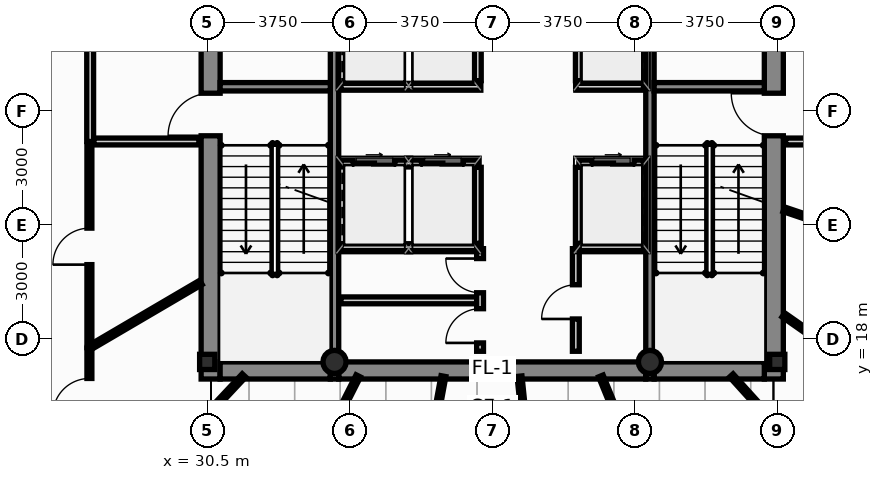
"""IFC4 building model, lengths in metres.
Left out: names, types, materials, properties, quantities, classifications, styles, units other than length and angle.
Written with IfcOpenShell. Run it as: python <this file> out.ifc"""

import sys

from ifc_helpers import new_model, si_unit, direction, frame, frame_2d, origin, origin_2d, place, context, subcontext, project, spatial, rectangle, hollow_circle, i_section, extrude, source, transform, mapped, element, fill, save


model = new_model("IFC4")
c1 = context("Model", 3, precision=1e-05, world=origin(), true_north=direction((0.0, 1.0)))
c2 = subcontext(c1, "Body", "Model", "MODEL_VIEW")
j1 = project(units=[si_unit("LENGTHUNIT", "METRE"), si_unit("PLANEANGLEUNIT", "RADIAN")], contexts=[c1])
p1 = place(None, origin())
s1 = spatial("IfcSite", under=j1, at=p1, CompositionType="ELEMENT")
p2 = place(p1, origin())
s2 = spatial("IfcBuilding", under=s1, at=p2, CompositionType="ELEMENT")
p3 = place(p2, frame((0.0, 0.0, 127.3)))
s3 = spatial("IfcBuildingStorey", under=s2, at=p3, CompositionType="ELEMENT", Elevation=127.3)
m1 = source(origin(), c2, "Body", "SweptSolid", [
    extrude(i_section(OverallWidth=0.4, OverallDepth=0.4, WebThickness=0.02, FlangeThickness=0.032, at=origin_2d()), origin(), (0.0, 0.0, 1.0), 4.5),
])
for number, where, z_axis, x_axis in (
    (1, (30.5, 17.4, 0.0), (0.0, 0.0, 1.0), (1.0, 0.0, 0.0)),
    (2, (45.5, 17.4, 0.0), (0.0, 0.0, 1.0), (1.0, 0.0, 0.0)),
):
    element("IfcColumn", number, at=place(p3, frame(where, z_axis=z_axis, x_axis=x_axis)), inside=s3, PredefinedType="COLUMN", context=c2, shape_type="MappedRepresentation", body=[
        mapped(m1, transform((0.0, 0.0, 0.0), scale=1.0)),
    ])
m2 = source(origin(), c2, "Body", "SweptSolid", [
    extrude(hollow_circle(Radius=0.305, WallThickness=0.025, at=origin_2d()), origin(), (0.0, 0.0, 1.0), 4.5),
])
for number, where, z_axis, x_axis in (
    (3, (33.85, 17.4, 0.0), (0.0, 0.0, 1.0), (1.0, 0.0, 0.0)),
    (4, (42.15, 17.4, 0.0), (0.0, 0.0, 1.0), (1.0, 0.0, 0.0)),
):
    element("IfcColumn", number, at=place(p3, frame(where, z_axis=z_axis, x_axis=x_axis)), inside=s3, PredefinedType="COLUMN", context=c2, shape_type="MappedRepresentation", body=[
        mapped(m2, transform((0.0, 0.0, 0.0), scale=1.0)),
    ])
p4 = place(p3, frame((30.59, 16.95, 0.0), z_axis=(0.0, 0.0, 1.0), x_axis=(0.0, 1.0, 0.0)))
e5 = element("IfcWall", 5, at=p4, inside=s3, PredefinedType="SHEAR", context=c2, shape_type="SweptSolid", body=[
    extrude(rectangle(XDim=13.275, YDim=0.5, at=frame_2d((6.638, 0.0))), origin(), (0.0, 0.0, 1.0), 4.5),
])
p5 = place(p4, frame((6.4, 0.0, 0.0)))
e6 = element("IfcOpeningElement", 6, at=p5, cuts=e5, PredefinedType="OPENING", context=c2, shape_type="SweptSolid", body=[
    extrude(rectangle(XDim=1.12, YDim=2.15, at=frame_2d((0.56, 1.075))), frame((0.0, 0.262, 0.0), z_axis=(0.0, -1.0, 0.0), x_axis=(1.0, 0.0, 0.0)), (0.0, 0.0, 1.0), 0.524),
])
p6 = place(p4, frame((10.85, 0.0, 0.0)))
e7 = element("IfcOpeningElement", 7, at=p6, cuts=e5, PredefinedType="OPENING", context=c2, shape_type="SweptSolid", body=[
    extrude(rectangle(XDim=1.2, YDim=2.2, at=frame_2d((0.6, 1.1))), frame((0.0, 0.262, 0.0), z_axis=(0.0, -1.0, 0.0), x_axis=(1.0, 0.0, 0.0)), (0.0, 0.0, 1.0), 0.524),
])
p7 = place(p3, frame((45.41, 16.95, 0.0), z_axis=(0.0, 0.0, 1.0), x_axis=(0.0, 1.0, 0.0)))
e8 = element("IfcWall", 8, at=p7, inside=s3, PredefinedType="SHEAR", context=c2, shape_type="SweptSolid", body=[
    extrude(rectangle(XDim=13.275, YDim=0.5, at=frame_2d((6.638, 0.0))), origin(), (0.0, 0.0, 1.0), 4.5),
])
p8 = place(p7, frame((6.4, 0.0, 0.0)))
e9 = element("IfcOpeningElement", 9, at=p8, cuts=e8, PredefinedType="OPENING", context=c2, shape_type="SweptSolid", body=[
    extrude(rectangle(XDim=1.12, YDim=2.15, at=frame_2d((0.56, 1.075))), frame((0.0, 0.262, 0.0), z_axis=(0.0, -1.0, 0.0), x_axis=(1.0, 0.0, 0.0)), (0.0, 0.0, 1.0), 0.524),
])
p9 = place(p7, frame((10.85, 0.0, 0.0)))
e10 = element("IfcOpeningElement", 10, at=p9, cuts=e8, PredefinedType="OPENING", context=c2, shape_type="SweptSolid", body=[
    extrude(rectangle(XDim=1.2, YDim=2.2, at=frame_2d((0.6, 1.1))), frame((0.0, 0.262, 0.0), z_axis=(0.0, -1.0, 0.0), x_axis=(1.0, 0.0, 0.0)), (0.0, 0.0, 1.0), 0.524),
])
p10 = place(p3, frame((30.84, 17.175, 0.0), z_axis=(0.0, 0.0, 1.0), x_axis=(1.0, 0.0, 0.0)))
e11 = element("IfcWall", 11, at=p10, inside=s3, PredefinedType="SHEAR", context=c2, shape_type="SweptSolid", body=[
    extrude(rectangle(XDim=2.9, YDim=0.45, at=frame_2d((1.45, 0.0))), origin(), (0.0, 0.0, 1.0), 4.5),
])
p11 = place(p3, frame((33.96, 17.175, 0.0), z_axis=(0.0, 0.0, 1.0), x_axis=(1.0, 0.0, 0.0)))
e12 = element("IfcWall", 12, at=p11, inside=s3, PredefinedType="SHEAR", context=c2, shape_type="SweptSolid", body=[
    extrude(rectangle(XDim=8.08, YDim=0.45, at=frame_2d((4.04, 0.0))), origin(), (0.0, 0.0, 1.0), 4.5),
])
p12 = place(p3, frame((42.26, 17.175, 0.0), z_axis=(0.0, 0.0, 1.0), x_axis=(1.0, 0.0, 0.0)))
e13 = element("IfcWall", 13, at=p12, inside=s3, PredefinedType="SHEAR", context=c2, shape_type="SweptSolid", body=[
    extrude(rectangle(XDim=2.9, YDim=0.45, at=frame_2d((1.45, 0.0))), origin(), (0.0, 0.0, 1.0), 4.5),
])
for number, where, z_axis, x_axis in (
    (14, (33.85, 16.95, 0.0), (0.0, 0.0, 1.0), (0.0, 1.0, 0.0)),
    (15, (42.15, 16.95, 0.0), (0.0, 0.0, 1.0), (0.0, 1.0, 0.0)),
):
    element("IfcWall", number, at=place(p3, frame(where, z_axis=z_axis, x_axis=x_axis)), inside=s3, PredefinedType="SHEAR", context=c2, shape_type="SweptSolid", body=[
        extrude(rectangle(XDim=13.275, YDim=0.22, at=frame_2d((6.638, 0.0))), origin(), (0.0, 0.0, 1.0), 4.5),
    ])
for number, where, z_axis, x_axis in (
    (16, (30.84, 24.64, 0.0), (0.0, 0.0, 1.0), (1.0, 0.0, 0.0)),
    (17, (42.26, 24.64, 0.0), (0.0, 0.0, 1.0), (1.0, 0.0, 0.0)),
):
    element("IfcWall", number, at=place(p3, frame(where, z_axis=z_axis, x_axis=x_axis)), inside=s3, PredefinedType="SHEAR", context=c2, shape_type="SweptSolid", body=[
        extrude(rectangle(XDim=2.9, YDim=0.22, at=frame_2d((1.45, 0.0))), origin(), (0.0, 0.0, 1.0), 4.5),
    ])
p13 = place(p3, frame((34.02, 22.62, 0.0), z_axis=(0.0, 0.0, 1.0), x_axis=(1.0, 0.0, 0.0)))
e18 = element("IfcWall", 18, at=p13, inside=s3, PredefinedType="PARTITIONING", context=c2, shape_type="SweptSolid", body=[
    extrude(rectangle(XDim=3.6, YDim=0.18, at=frame_2d((1.8, 0.0))), origin(), (0.0, 0.0, 1.0), 4.25),
])
p14 = place(p13, frame((0.32, 0.0, 0.0)))
e19 = element("IfcOpeningElement", 19, at=p14, cuts=e18, PredefinedType="OPENING", context=c2, shape_type="SweptSolid", body=[
    extrude(rectangle(XDim=1.1, YDim=2.2, at=frame_2d((0.55, 1.1))), frame((0.0, 0.102, 0.0), z_axis=(0.0, -1.0, 0.0), x_axis=(1.0, 0.0, 0.0)), (0.0, 0.0, 1.0), 0.204),
])
p15 = place(p13, frame((2.12, 0.0, 0.0)))
e20 = element("IfcOpeningElement", 20, at=p15, cuts=e18, PredefinedType="OPENING", context=c2, shape_type="SweptSolid", body=[
    extrude(rectangle(XDim=1.1, YDim=2.2, at=frame_2d((0.55, 1.1))), frame((0.0, 0.102, 0.0), z_axis=(0.0, -1.0, 0.0), x_axis=(1.0, 0.0, 0.0)), (0.0, 0.0, 1.0), 0.204),
])
p16 = place(p3, frame((40.28, 22.62, 0.0), z_axis=(0.0, 0.0, 1.0), x_axis=(1.0, 0.0, 0.0)))
e21 = element("IfcWall", 21, at=p16, inside=s3, PredefinedType="PARTITIONING", context=c2, shape_type="SweptSolid", body=[
    extrude(rectangle(XDim=1.7, YDim=0.18, at=frame_2d((0.85, 0.0))), origin(), (0.0, 0.0, 1.0), 4.25),
])
p17 = place(p16, frame((0.35, 0.0, 0.0)))
e22 = element("IfcOpeningElement", 22, at=p17, cuts=e21, PredefinedType="OPENING", context=c2, shape_type="SweptSolid", body=[
    extrude(rectangle(XDim=1.1, YDim=2.2, at=frame_2d((0.55, 1.1))), frame((0.0, 0.102, 0.0), z_axis=(0.0, -1.0, 0.0), x_axis=(1.0, 0.0, 0.0)), (0.0, 0.0, 1.0), 0.204),
])
for number, where, z_axis, x_axis in (
    (23, (37.62, 20.52, 0.0), (0.0, 0.0, 1.0), (0.0, 1.0, 0.0)),
    (24, (40.28, 20.52, 0.0), (0.0, 0.0, 1.0), (0.0, 1.0, 0.0)),
    (25, (37.62, 24.8, 0.0), (0.0, 0.0, 1.0), (0.0, 1.0, 0.0)),
    (26, (40.28, 24.8, 0.0), (0.0, 0.0, 1.0), (0.0, 1.0, 0.0)),
):
    element("IfcWall", number, at=place(p3, frame(where, z_axis=z_axis, x_axis=x_axis)), inside=s3, PredefinedType="PARTITIONING", context=c2, shape_type="SweptSolid", body=[
        extrude(rectangle(XDim=2.0, YDim=0.18, at=frame_2d((1.0, 0.0))), origin(), (0.0, 0.0, 1.0), 4.25),
    ])
p18 = place(p3, frame((34.02, 24.64, 0.0), z_axis=(0.0, 0.0, 1.0), x_axis=(1.0, 0.0, 0.0)))
e27 = element("IfcWall", 27, at=p18, inside=s3, PredefinedType="PARTITIONING", context=c2, shape_type="SweptSolid", body=[
    extrude(rectangle(XDim=3.68, YDim=0.18, at=frame_2d((1.84, 0.0))), origin(), (0.0, 0.0, 1.0), 4.25),
])
p19 = place(p3, frame((40.2, 24.64, 0.0), z_axis=(0.0, 0.0, 1.0), x_axis=(1.0, 0.0, 0.0)))
e28 = element("IfcWall", 28, at=p19, inside=s3, PredefinedType="PARTITIONING", context=c2, shape_type="SweptSolid", body=[
    extrude(rectangle(XDim=1.78, YDim=0.18, at=frame_2d((0.89, 0.0))), origin(), (0.0, 0.0, 1.0), 4.25),
])
p20 = place(p3, frame((27.42, 23.2, 0.0), z_axis=(0.0, 0.0, 1.0), x_axis=(0.0, 1.0, 0.0)))
e29 = element("IfcWall", 29, at=p20, inside=s3, PredefinedType="PARTITIONING", context=c2, shape_type="SweptSolid", body=[
    extrude(rectangle(XDim=6.4, YDim=0.18, at=frame_2d((3.2, 0.0))), origin(), (0.0, 0.0, 1.0), 3.928),
])
p21 = place(p20, frame((2.65, 0.0, 0.0)))
e30 = element("IfcOpeningElement", 30, at=p21, cuts=e29, PredefinedType="OPENING", context=c2, shape_type="SweptSolid", body=[
    extrude(rectangle(XDim=1.05, YDim=2.15, at=frame_2d((0.525, 1.075))), frame((0.0, 0.102, 0.0), z_axis=(0.0, -1.0, 0.0), x_axis=(1.0, 0.0, 0.0)), (0.0, 0.0, 1.0), 0.204),
])
for number, where, z_axis, x_axis in (
    (31, (27.52, 23.2, 0.0), (0.0, 0.0, 1.0), (1.0, 0.0, 0.0)),
    (32, (45.72, 23.2, 0.0), (0.0, 0.0, 1.0), (1.0, 0.0, 0.0)),
):
    element("IfcWall", number, at=place(p3, frame(where, z_axis=z_axis, x_axis=x_axis)), inside=s3, PredefinedType="PARTITIONING", context=c2, shape_type="SweptSolid", body=[
        extrude(rectangle(XDim=2.76, YDim=0.18, at=frame_2d((1.38, 0.0))), origin(), (0.0, 0.0, 1.0), 4.25),
    ])
p22 = place(p3, frame((34.02, 20.42, 0.0), z_axis=(0.0, 0.0, 1.0), x_axis=(1.0, 0.0, 0.0)))
e33 = element("IfcWall", 33, at=p22, inside=s3, PredefinedType="PARTITIONING", context=c2, shape_type="SweptSolid", body=[
    extrude(rectangle(XDim=3.64, YDim=0.18, at=frame_2d((1.82, 0.0))), origin(), (0.0, 0.0, 1.0), 4.25),
])
p23 = place(p3, frame((40.22, 20.42, 0.0), z_axis=(0.0, 0.0, 1.0), x_axis=(1.0, 0.0, 0.0)))
e34 = element("IfcWall", 34, at=p23, inside=s3, PredefinedType="PARTITIONING", context=c2, shape_type="SweptSolid", body=[
    extrude(rectangle(XDim=1.76, YDim=0.18, at=frame_2d((0.88, 0.0))), origin(), (0.0, 0.0, 1.0), 4.25),
])
p24 = place(p3, frame((34.02, 19.02, 0.0), z_axis=(0.0, 0.0, 1.0), x_axis=(1.0, 0.0, 0.0)))
e35 = element("IfcWall", 35, at=p24, inside=s3, PredefinedType="PARTITIONING", context=c2, shape_type="SweptSolid", body=[
    extrude(rectangle(XDim=3.58, YDim=0.18, at=frame_2d((1.79, 0.0))), origin(), (0.0, 0.0, 1.0), 4.25),
])
p25 = place(p3, frame((37.68, 17.68, 0.0), z_axis=(0.0, 0.0, 1.0), x_axis=(0.0, 1.0, 0.0)))
e36 = element("IfcWall", 36, at=p25, inside=s3, PredefinedType="PARTITIONING", context=c2, shape_type="SweptSolid", body=[
    extrude(rectangle(XDim=2.7, YDim=0.18, at=frame_2d((1.35, 0.0))), origin(), (0.0, 0.0, 1.0), 4.25),
])
p26 = place(p25, frame((0.22, 0.0, 0.0)))
e37 = element("IfcOpeningElement", 37, at=p26, cuts=e36, PredefinedType="OPENING", context=c2, shape_type="SweptSolid", body=[
    extrude(rectangle(XDim=0.9, YDim=2.1, at=frame_2d((0.45, 1.05))), frame((0.0, 0.102, 0.0), z_axis=(0.0, -1.0, 0.0), x_axis=(1.0, 0.0, 0.0)), (0.0, 0.0, 1.0), 0.204),
])
p27 = place(p25, frame((1.54, 0.0, 0.0)))
e38 = element("IfcOpeningElement", 38, at=p27, cuts=e36, PredefinedType="OPENING", context=c2, shape_type="SweptSolid", body=[
    extrude(rectangle(XDim=0.9, YDim=2.1, at=frame_2d((0.45, 1.05))), frame((0.0, 0.102, 0.0), z_axis=(0.0, -1.0, 0.0), x_axis=(1.0, 0.0, 0.0)), (0.0, 0.0, 1.0), 0.204),
])
p28 = place(p3, frame((40.2, 17.68, 0.0), z_axis=(0.0, 0.0, 1.0), x_axis=(0.0, 1.0, 0.0)))
e39 = element("IfcWall", 39, at=p28, inside=s3, PredefinedType="PARTITIONING", context=c2, shape_type="SweptSolid", body=[
    extrude(rectangle(XDim=2.7, YDim=0.18, at=frame_2d((1.35, 0.0))), origin(), (0.0, 0.0, 1.0), 4.25),
])
p29 = place(p28, frame((0.85, 0.0, 0.0)))
e40 = element("IfcOpeningElement", 40, at=p29, cuts=e39, PredefinedType="OPENING", context=c2, shape_type="SweptSolid", body=[
    extrude(rectangle(XDim=0.9, YDim=2.1, at=frame_2d((0.45, 1.05))), frame((0.0, 0.102, 0.0), z_axis=(0.0, -1.0, 0.0), x_axis=(1.0, 0.0, 0.0)), (0.0, 0.0, 1.0), 0.204),
])
p30 = place(p3, frame((45.671, 21.416, 0.0), z_axis=(0.0, 0.0, 1.0), x_axis=(0.947472988425, -0.319835795691, 0.0)))
e41 = element("IfcWall", 41, at=p30, inside=s3, PredefinedType="PARTITIONING", context=c2, shape_type="SweptSolid", body=[
    extrude(rectangle(XDim=18.887, YDim=0.13, at=frame_2d((9.444, 0.0))), origin(), (0.0, 0.0, 1.0), 4.25),
])
p31 = place(p30, frame((9.034, 0.0, 0.0)))
e42 = element("IfcOpeningElement", 42, at=p31, cuts=e41, PredefinedType="OPENING", context=c2, shape_type="SweptSolid", body=[
    extrude(rectangle(XDim=0.96, YDim=2.15, at=frame_2d((0.48, 1.075))), frame((0.0, 0.077, 0.0), z_axis=(0.0, -1.0, 0.0), x_axis=(1.0, 0.0, 0.0)), (0.0, 0.0, 1.0), 0.154),
])
p32 = place(p3, frame((45.661, 18.637, 0.0), z_axis=(0.0, 0.0, 1.0), x_axis=(0.819078192958, -0.573681892533, 0.0)))
e43 = element("IfcWall", 43, at=p32, inside=s3, PredefinedType="PARTITIONING", context=c2, shape_type="SweptSolid", body=[
    extrude(rectangle(XDim=17.313, YDim=0.13, at=frame_2d((8.656, 0.0))), origin(), (0.0, 0.0, 1.0), 4.25),
])
p33 = place(p3, frame((20.781, 5.646, 0.0), z_axis=(0.0, 0.0, 1.0), x_axis=(0.684024279875, 0.729459241179, 0.0)))
e44 = element("IfcWall", 44, at=p33, inside=s3, PredefinedType="PARTITIONING", context=c2, shape_type="SweptSolid", body=[
    extrude(rectangle(XDim=15.626, YDim=0.13, at=frame_2d((7.813, 0.0))), origin(), (0.0, 0.0, 1.0), 3.775),
])
p34 = place(p33, frame((7.399, 0.0, 0.0)))
e45 = element("IfcOpeningElement", 45, at=p34, cuts=e44, PredefinedType="OPENING", context=c2, shape_type="SweptSolid", body=[
    extrude(rectangle(XDim=0.96, YDim=2.15, at=frame_2d((0.48, 1.075))), frame((0.0, 0.077, 0.0), z_axis=(0.0, -1.0, 0.0), x_axis=(1.0, 0.0, 0.0)), (0.0, 0.0, 1.0), 0.154),
])
p35 = place(p3, frame((44.29, 17.044, 0.0), z_axis=(0.0, 0.0, 1.0), x_axis=(0.670937503188, -0.74151390197, 0.0)))
e46 = element("IfcWall", 46, at=p35, inside=s3, PredefinedType="PARTITIONING", context=c2, shape_type="SweptSolid", body=[
    extrude(rectangle(XDim=14.806, YDim=0.13, at=frame_2d((7.403, 0.0))), origin(), (0.0, 0.0, 1.0), 3.775),
])
p36 = place(p35, frame((6.987, 0.0, 0.0)))
e47 = element("IfcOpeningElement", 47, at=p36, cuts=e46, PredefinedType="OPENING", context=c2, shape_type="SweptSolid", body=[
    extrude(rectangle(XDim=0.96, YDim=2.15, at=frame_2d((0.48, 1.075))), frame((0.0, 0.077, 0.0), z_axis=(0.0, -1.0, 0.0), x_axis=(1.0, 0.0, 0.0)), (0.0, 0.0, 1.0), 0.154),
])
p37 = place(p3, frame((28.769, 5.747, 0.0), z_axis=(0.0, 0.0, 1.0), x_axis=(0.451262780951, 0.892391115223, 0.0)))
e48 = element("IfcWall", 48, at=p37, inside=s3, PredefinedType="PARTITIONING", context=c2, shape_type="SweptSolid", body=[
    extrude(rectangle(XDim=12.647, YDim=0.13, at=frame_2d((6.324, 0.0))), origin(), (0.0, 0.0, 1.0), 4.25),
])
p38 = place(p37, frame((5.898, 0.0, 0.0)))
e49 = element("IfcOpeningElement", 49, at=p38, cuts=e48, PredefinedType="OPENING", context=c2, shape_type="SweptSolid", body=[
    extrude(rectangle(XDim=0.96, YDim=2.15, at=frame_2d((0.48, 1.075))), frame((0.0, 0.077, 0.0), z_axis=(0.0, -1.0, 0.0), x_axis=(1.0, 0.0, 0.0)), (0.0, 0.0, 1.0), 0.154),
])
p39 = place(p3, frame((40.858, 17.031, 0.0), z_axis=(0.0, 0.0, 1.0), x_axis=(0.37877899571, -0.925487154103, 0.0)))
e50 = element("IfcWall", 50, at=p39, inside=s3, PredefinedType="PARTITIONING", context=c2, shape_type="SweptSolid", body=[
    extrude(rectangle(XDim=11.968, YDim=0.13, at=frame_2d((5.984, 0.0))), origin(), (0.0, 0.0, 1.0), 4.25),
])
p40 = place(p39, frame((5.555, 0.0, 0.0)))
e51 = element("IfcOpeningElement", 51, at=p40, cuts=e50, PredefinedType="OPENING", context=c2, shape_type="SweptSolid", body=[
    extrude(rectangle(XDim=0.96, YDim=2.15, at=frame_2d((0.48, 1.075))), frame((0.0, 0.077, 0.0), z_axis=(0.0, -1.0, 0.0), x_axis=(1.0, 0.0, 0.0)), (0.0, 0.0, 1.0), 0.154),
])
p41 = place(p3, frame((34.648, 5.82, 0.0), z_axis=(0.0, 0.0, 1.0), x_axis=(0.181454718714, 0.983399300923, 0.0)))
e52 = element("IfcWall", 52, at=p41, inside=s3, PredefinedType="PARTITIONING", context=c2, shape_type="SweptSolid", body=[
    extrude(rectangle(XDim=11.395, YDim=0.13, at=frame_2d((5.697, 0.0))), origin(), (0.0, 0.0, 1.0), 4.25),
])
p42 = place(p41, frame((5.268, 0.0, 0.0)))
e53 = element("IfcOpeningElement", 53, at=p42, cuts=e52, PredefinedType="OPENING", context=c2, shape_type="SweptSolid", body=[
    extrude(rectangle(XDim=0.96, YDim=2.15, at=frame_2d((0.48, 1.075))), frame((0.0, 0.077, 0.0), z_axis=(0.0, -1.0, 0.0), x_axis=(1.0, 0.0, 0.0)), (0.0, 0.0, 1.0), 0.154),
])
p43 = place(p3, frame((38.718, 17.025, 0.0), z_axis=(0.0, 0.0, 1.0), x_axis=(0.102876837546, -0.994694101871, 0.0)))
e54 = element("IfcWall", 54, at=p43, inside=s3, PredefinedType="PARTITIONING", context=c2, shape_type="SweptSolid", body=[
    extrude(rectangle(XDim=11.199, YDim=0.13, at=frame_2d((5.599, 0.0))), origin(), (0.0, 0.0, 1.0), 4.25),
])
p44 = place(p43, frame((5.167, 0.0, 0.0)))
e55 = element("IfcOpeningElement", 55, at=p44, cuts=e54, PredefinedType="OPENING", context=c2, shape_type="SweptSolid", body=[
    extrude(rectangle(XDim=0.96, YDim=2.15, at=frame_2d((0.48, 1.075))), frame((0.0, 0.077, 0.0), z_axis=(0.0, -1.0, 0.0), x_axis=(1.0, 0.0, 0.0)), (0.0, 0.0, 1.0), 0.154),
])
p45 = place(p3, frame((27.4, 17.775, 0.0), z_axis=(0.0, 0.0, 1.0), x_axis=(0.0, 1.0, 0.0)))
e56 = element("IfcWall", 56, at=p45, inside=s3, PredefinedType="PARTITIONING", context=c2, shape_type="SweptSolid", body=[
    extrude(rectangle(XDim=5.33, YDim=0.13, at=frame_2d((2.665, 0.0))), origin(), (0.0, 0.0, 1.0), 4.25),
])
p46 = place(p45, frame((2.185, 0.0, 0.0)))
e57 = element("IfcOpeningElement", 57, at=p46, cuts=e56, PredefinedType="OPENING", context=c2, shape_type="SweptSolid", body=[
    extrude(rectangle(XDim=0.96, YDim=2.15, at=frame_2d((0.48, 1.075))), frame((0.0, 0.077, 0.0), z_axis=(0.0, -1.0, 0.0), x_axis=(1.0, 0.0, 0.0)), (0.0, 0.0, 1.0), 0.154),
])
p47 = place(p3, frame((27.404, 17.773, 0.0), z_axis=(0.0, 0.0, 1.0), x_axis=(0.86258552872, 0.505911262617, 0.0)))
e58 = element("IfcWall", 58, at=p47, inside=s3, PredefinedType="PARTITIONING", context=c2, shape_type="SweptSolid", body=[
    extrude(rectangle(XDim=3.398, YDim=0.13, at=frame_2d((1.699, 0.0))), origin(), (0.0, 0.0, 1.0), 4.25),
])
p48 = place(p3, frame((27.4, 15.205, 0.0), z_axis=(0.0, 0.0, 1.0), x_axis=(0.0, 1.0, 0.0)))
e59 = element("IfcWall", 59, at=p48, inside=s3, PredefinedType="PARTITIONING", context=c2, shape_type="SweptSolid", body=[
    extrude(rectangle(XDim=2.56, YDim=0.13, at=frame_2d((1.28, 0.0))), origin(), (0.0, 0.0, 1.0), 4.25),
])
p49 = place(p48, frame((0.8, 0.0, 0.0)))
e60 = element("IfcOpeningElement", 60, at=p49, cuts=e59, PredefinedType="OPENING", context=c2, shape_type="SweptSolid", body=[
    extrude(rectangle(XDim=0.96, YDim=2.15, at=frame_2d((0.48, 1.075))), frame((0.0, 0.077, 0.0), z_axis=(0.0, -1.0, 0.0), x_axis=(1.0, 0.0, 0.0)), (0.0, 0.0, 1.0), 0.154),
])
p50 = place(p5, origin())
e61 = element("IfcDoor", 61, at=p50, inside=s3, OperationType="SINGLE_SWING_LEFT", PredefinedType="DOOR", context=c2, shape_type="SweptSolid", body=[
    extrude(rectangle(XDim=1.12, YDim=2.15, at=frame_2d((0.56, 1.075))), frame((0.0, 0.025, 0.0), z_axis=(0.0, -1.0, 0.0), x_axis=(1.0, 0.0, 0.0)), (0.0, 0.0, 1.0), 0.05),
])
fill(e6, e61)
p51 = place(p8, origin())
e62 = element("IfcDoor", 62, at=p51, inside=s3, OperationType="SINGLE_SWING_RIGHT", PredefinedType="DOOR", context=c2, shape_type="SweptSolid", body=[
    extrude(rectangle(XDim=1.12, YDim=2.15, at=frame_2d((0.56, 1.075))), frame((0.0, 0.025, 0.0), z_axis=(0.0, -1.0, 0.0), x_axis=(1.0, 0.0, 0.0)), (0.0, 0.0, 1.0), 0.05),
])
fill(e9, e62)
p52 = place(p14, origin())
e63 = element("IfcDoor", 63, at=p52, inside=s3, OperationType="SLIDING_TO_LEFT", PredefinedType="DOOR", context=c2, shape_type="SweptSolid", body=[
    extrude(rectangle(XDim=1.1, YDim=2.2, at=frame_2d((0.55, 1.1))), frame((0.0, 0.025, 0.0), z_axis=(0.0, -1.0, 0.0), x_axis=(1.0, 0.0, 0.0)), (0.0, 0.0, 1.0), 0.05),
])
fill(e19, e63)
p53 = place(p15, origin())
e64 = element("IfcDoor", 64, at=p53, inside=s3, OperationType="SLIDING_TO_RIGHT", PredefinedType="DOOR", context=c2, shape_type="SweptSolid", body=[
    extrude(rectangle(XDim=1.1, YDim=2.2, at=frame_2d((0.55, 1.1))), frame((0.0, 0.025, 0.0), z_axis=(0.0, -1.0, 0.0), x_axis=(1.0, 0.0, 0.0)), (0.0, 0.0, 1.0), 0.05),
])
fill(e20, e64)
p54 = place(p17, origin())
e65 = element("IfcDoor", 65, at=p54, inside=s3, OperationType="SLIDING_TO_LEFT", PredefinedType="DOOR", context=c2, shape_type="SweptSolid", body=[
    extrude(rectangle(XDim=1.1, YDim=2.2, at=frame_2d((0.55, 1.1))), frame((0.0, 0.025, 0.0), z_axis=(0.0, -1.0, 0.0), x_axis=(1.0, 0.0, 0.0)), (0.0, 0.0, 1.0), 0.05),
])
fill(e22, e65)
p55 = place(p26, origin())
e66 = element("IfcDoor", 66, at=p55, inside=s3, OperationType="SINGLE_SWING_LEFT", PredefinedType="DOOR", context=c2, shape_type="SweptSolid", body=[
    extrude(rectangle(XDim=0.9, YDim=2.1, at=frame_2d((0.45, 1.05))), frame((0.0, 0.025, 0.0), z_axis=(0.0, -1.0, 0.0), x_axis=(1.0, 0.0, 0.0)), (0.0, 0.0, 1.0), 0.05),
])
fill(e37, e66)
p56 = place(p27, origin())
e67 = element("IfcDoor", 67, at=p56, inside=s3, OperationType="SINGLE_SWING_RIGHT", PredefinedType="DOOR", context=c2, shape_type="SweptSolid", body=[
    extrude(rectangle(XDim=0.9, YDim=2.1, at=frame_2d((0.45, 1.05))), frame((0.0, 0.025, 0.0), z_axis=(0.0, -1.0, 0.0), x_axis=(1.0, 0.0, 0.0)), (0.0, 0.0, 1.0), 0.05),
])
fill(e38, e67)
p57 = place(p29, origin())
e68 = element("IfcDoor", 68, at=p57, inside=s3, OperationType="SINGLE_SWING_LEFT", PredefinedType="DOOR", context=c2, shape_type="SweptSolid", body=[
    extrude(rectangle(XDim=0.9, YDim=2.1, at=frame_2d((0.45, 1.05))), frame((0.0, 0.025, 0.0), z_axis=(0.0, -1.0, 0.0), x_axis=(1.0, 0.0, 0.0)), (0.0, 0.0, 1.0), 0.05),
])
fill(e40, e68)
p58 = place(p46, origin())
e69 = element("IfcDoor", 69, at=p58, inside=s3, OperationType="SINGLE_SWING_LEFT", PredefinedType="DOOR", context=c2, shape_type="SweptSolid", body=[
    extrude(rectangle(XDim=0.96, YDim=2.15, at=frame_2d((0.48, 1.075))), frame((0.0, 0.025, 0.0), z_axis=(0.0, -1.0, 0.0), x_axis=(1.0, 0.0, 0.0)), (0.0, 0.0, 1.0), 0.05),
])
fill(e57, e69)
p59 = place(p49, origin())
e70 = element("IfcDoor", 70, at=p59, inside=s3, OperationType="SINGLE_SWING_LEFT", PredefinedType="DOOR", context=c2, shape_type="SweptSolid", body=[
    extrude(rectangle(XDim=0.96, YDim=2.15, at=frame_2d((0.48, 1.075))), frame((0.0, 0.025, 0.0), z_axis=(0.0, -1.0, 0.0), x_axis=(1.0, 0.0, 0.0)), (0.0, 0.0, 1.0), 0.05),
])
fill(e60, e70)
save(model, sys.argv[1])
